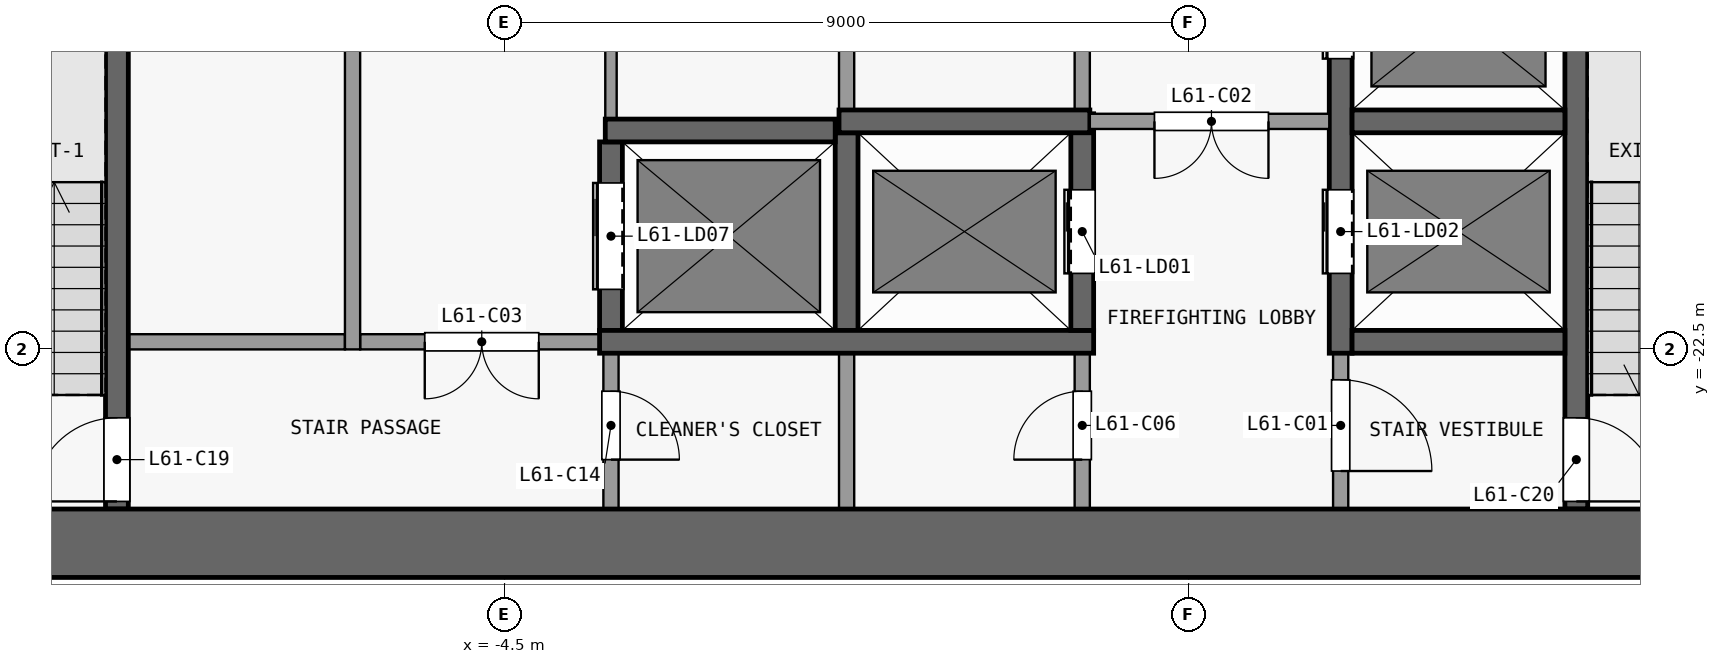
"""IFC4 building model, lengths in metres.
Left out: names, types, materials, properties, quantities, classifications, styles, units other than length and angle.
Written with IfcOpenShell. Run it as: python <this file> out.ifc"""

import sys

from ifc_helpers import new_model, si_unit, direction, frame, frame_2d, origin, place, context, subcontext, project, spatial, rectangle, extrude, element, fill, save


model = new_model("IFC4")
c1 = context("Model", 3, precision=1e-05, world=origin(), true_north=direction((0.0, 1.0)))
c2 = subcontext(c1, "Body", "Model", "MODEL_VIEW")
j1 = project(units=[si_unit("LENGTHUNIT", "METRE"), si_unit("PLANEANGLEUNIT", "RADIAN")], contexts=[c1])
p1 = place(None, origin())
s1 = spatial("IfcSite", under=j1, at=p1, CompositionType="ELEMENT")
p2 = place(p1, origin())
s2 = spatial("IfcBuilding", under=s1, at=p2, CompositionType="ELEMENT")
p3 = place(p2, frame((0.0, 0.0, 241.1)))
s3 = spatial("IfcBuildingStorey", under=s2, at=p3, CompositionType="ELEMENT", Elevation=241.1)
p4 = place(p3, frame((-13.2, -25.05, 0.0), z_axis=(0.0, 0.0, 1.0), x_axis=(1.0, 0.0, 0.0)))
e1 = element("IfcWall", 1, at=p4, inside=s3, PredefinedType="SHEAR", context=c2, shape_type="SweptSolid", body=[
    extrude(rectangle(XDim=26.4, YDim=0.9, at=frame_2d((13.2, 0.0))), origin(), (0.0, 0.0, 1.0), 3.3),
])
p5 = place(p3, frame((-9.45, -22.4, 0.0), z_axis=(0.0, 0.0, 1.0), x_axis=(1.0, 0.0, 0.0)))
e2 = element("IfcWall", 2, at=p5, inside=s3, PredefinedType="PARTITIONING", context=c2, shape_type="SweptSolid", body=[
    extrude(rectangle(XDim=2.85, YDim=0.2, at=frame_2d((1.425, 0.0))), origin(), (0.0, 0.0, 1.0), 3.3),
])
p6 = place(p3, frame((-3.25, -22.4, 0.0), z_axis=(0.0, 0.0, 1.0), x_axis=(-1.0, 0.0, 0.0)))
e3 = element("IfcWall", 3, at=p6, inside=s3, PredefinedType="PARTITIONING", context=c2, shape_type="SweptSolid", body=[
    extrude(rectangle(XDim=3.15, YDim=0.2, at=frame_2d((1.575, 0.0))), origin(), (0.0, 0.0, 1.0), 3.3),
])
p7 = place(p6, frame((0.8, 0.0, 0.0)))
e4 = element("IfcOpeningElement", 4, at=p7, cuts=e3, PredefinedType="OPENING", context=c2, shape_type="SweptSolid", body=[
    extrude(rectangle(XDim=1.5, YDim=2.1, at=frame_2d((0.75, 1.05))), frame((0.0, 0.11, 0.0), z_axis=(0.0, -1.0, 0.0), x_axis=(1.0, 0.0, 0.0)), (0.0, 0.0, 1.0), 0.22),
])
p8 = place(p3, frame((-3.25, -22.4, 0.0), z_axis=(0.0, 0.0, 1.0), x_axis=(1.0, 0.0, 0.0)))
e5 = element("IfcWall", 5, at=p8, inside=s3, PredefinedType="SHEAR", context=c2, shape_type="SweptSolid", body=[
    extrude(rectangle(XDim=6.5, YDim=0.3, at=frame_2d((3.25, 0.0))), origin(), (0.0, 0.0, 1.0), 3.3),
])
p9 = place(p3, frame((6.65, -22.4, 0.0), z_axis=(0.0, 0.0, 1.0), x_axis=(1.0, 0.0, 0.0)))
e6 = element("IfcWall", 6, at=p9, inside=s3, PredefinedType="SHEAR", context=c2, shape_type="SweptSolid", body=[
    extrude(rectangle(XDim=2.8, YDim=0.3, at=frame_2d((1.4, 0.0))), origin(), (0.0, 0.0, 1.0), 3.3),
])
p10 = place(p3, frame((-3.175, -19.62, 0.0), z_axis=(0.0, 0.0, 1.0), x_axis=(1.0, 0.0, 0.0)))
e7 = element("IfcWall", 7, at=p10, inside=s3, PredefinedType="SHEAR", context=c2, shape_type="SweptSolid", body=[
    extrude(rectangle(XDim=3.025, YDim=0.3, at=frame_2d((1.513, 0.0))), origin(), (0.0, 0.0, 1.0), 3.3),
])
p11 = place(p3, frame((-0.1, -19.5, 0.0), z_axis=(0.0, 0.0, 1.0), x_axis=(1.0, 0.0, 0.0)))
e8 = element("IfcWall", 8, at=p11, inside=s3, PredefinedType="SHEAR", context=c2, shape_type="SweptSolid", body=[
    extrude(rectangle(XDim=3.3, YDim=0.3, at=frame_2d((1.65, 0.0))), origin(), (0.0, 0.0, 1.0), 3.3),
])
p12 = place(p3, frame((6.35, -19.5, 0.0), z_axis=(0.0, 0.0, 1.0), x_axis=(-1.0, 0.0, 0.0)))
e9 = element("IfcWall", 9, at=p12, inside=s3, PredefinedType="PARTITIONING", context=c2, shape_type="SweptSolid", body=[
    extrude(rectangle(XDim=3.15, YDim=0.2, at=frame_2d((1.575, 0.0))), origin(), (0.0, 0.0, 1.0), 3.3),
])
p13 = place(p12, frame((0.8, 0.0, 0.0)))
e10 = element("IfcOpeningElement", 10, at=p13, cuts=e9, PredefinedType="OPENING", context=c2, shape_type="SweptSolid", body=[
    extrude(rectangle(XDim=1.5, YDim=2.1, at=frame_2d((0.75, 1.05))), frame((0.0, 0.11, 0.0), z_axis=(0.0, -1.0, 0.0), x_axis=(1.0, 0.0, 0.0)), (0.0, 0.0, 1.0), 0.22),
])
p14 = place(p3, frame((6.65, -19.5, 0.0), z_axis=(0.0, 0.0, 1.0), x_axis=(1.0, 0.0, 0.0)))
e11 = element("IfcWall", 11, at=p14, inside=s3, PredefinedType="SHEAR", context=c2, shape_type="SweptSolid", body=[
    extrude(rectangle(XDim=2.8, YDim=0.3, at=frame_2d((1.4, 0.0))), origin(), (0.0, 0.0, 1.0), 3.3),
])
p15 = place(p3, frame((-9.6, -24.6, 0.0), z_axis=(0.0, 0.0, 1.0), x_axis=(0.0, 1.0, 0.0)))
e12 = element("IfcWall", 12, at=p15, inside=s3, PredefinedType="SHEAR", context=c2, shape_type="SweptSolid", body=[
    extrude(rectangle(XDim=7.7, YDim=0.3, at=frame_2d((3.85, 0.0))), origin(), (0.0, 0.0, 1.0), 3.3),
])
p16 = place(p15, frame((0.1, 0.0, 0.0)))
e13 = element("IfcOpeningElement", 13, at=p16, cuts=e12, PredefinedType="OPENING", context=c2, shape_type="SweptSolid", body=[
    extrude(rectangle(XDim=1.1, YDim=2.1, at=frame_2d((0.55, 1.05))), frame((0.0, 0.16, 0.0), z_axis=(0.0, -1.0, 0.0), x_axis=(1.0, 0.0, 0.0)), (0.0, 0.0, 1.0), 0.32),
])
p17 = place(p3, frame((-6.5, -22.5, 0.0), z_axis=(0.0, 0.0, 1.0), x_axis=(0.0, 1.0, 0.0)))
e14 = element("IfcWall", 14, at=p17, inside=s3, PredefinedType="PARTITIONING", context=c2, shape_type="SweptSolid", body=[
    extrude(rectangle(XDim=14.0, YDim=0.2, at=frame_2d((7.0, 0.0))), origin(), (0.0, 0.0, 1.0), 3.3),
])
p18 = place(p17, frame((6.45, 0.0, 0.0)))
e15 = element("IfcOpeningElement", 15, at=p18, cuts=e14, PredefinedType="OPENING", context=c2, shape_type="SweptSolid", body=[
    extrude(rectangle(XDim=1.2, YDim=2.1, at=frame_2d((0.6, 1.05))), frame((0.0, 0.11, 0.0), z_axis=(0.0, -1.0, 0.0), x_axis=(1.0, 0.0, 0.0)), (0.0, 0.0, 1.0), 0.22),
])
p19 = place(p3, frame((-3.1, -22.55, 0.0), z_axis=(0.0, 0.0, 1.0), x_axis=(0.0, -1.0, 0.0)))
e16 = element("IfcWall", 16, at=p19, inside=s3, PredefinedType="PARTITIONING", context=c2, shape_type="SweptSolid", body=[
    extrude(rectangle(XDim=2.05, YDim=0.2, at=frame_2d((1.025, 0.0))), origin(), (0.0, 0.0, 1.0), 3.3),
])
p20 = place(p19, frame((0.5, 0.0, 0.0)))
e17 = element("IfcOpeningElement", 17, at=p20, cuts=e16, PredefinedType="OPENING", context=c2, shape_type="SweptSolid", body=[
    extrude(rectangle(XDim=0.9, YDim=2.1, at=frame_2d((0.45, 1.05))), frame((0.0, 0.11, 0.0), z_axis=(0.0, -1.0, 0.0), x_axis=(1.0, 0.0, 0.0)), (0.0, 0.0, 1.0), 0.22),
])
p21 = place(p3, frame((-3.1, -22.25, 0.0), z_axis=(0.0, 0.0, 1.0), x_axis=(0.0, 1.0, 0.0)))
e18 = element("IfcWall", 18, at=p21, inside=s3, PredefinedType="SHEAR", context=c2, shape_type="SweptSolid", body=[
    extrude(rectangle(XDim=2.48, YDim=0.3, at=frame_2d((1.24, 0.0))), origin(), (0.0, 0.0, 1.0), 3.3),
])
p22 = place(p21, frame((0.54, 0.0, 0.0)))
e19 = element("IfcOpeningElement", 19, at=p22, cuts=e18, PredefinedType="OPENING", context=c2, shape_type="SweptSolid", body=[
    extrude(rectangle(XDim=1.4, YDim=2.1, at=frame_2d((0.7, 1.05))), frame((0.0, 0.16, 0.0), z_axis=(0.0, -1.0, 0.0), x_axis=(1.0, 0.0, 0.0)), (0.0, 0.0, 1.0), 0.32),
])
p23 = place(p3, frame((-3.1, -8.5, 0.0), z_axis=(0.0, 0.0, 1.0), x_axis=(0.0, -1.0, 0.0)))
e20 = element("IfcWall", 20, at=p23, inside=s3, PredefinedType="PARTITIONING", context=c2, shape_type="SweptSolid", body=[
    extrude(rectangle(XDim=10.97, YDim=0.15, at=frame_2d((5.485, 0.0))), origin(), (0.0, 0.0, 1.0), 3.3),
])
p24 = place(p23, frame((7.74, 0.0, 0.0)))
e21 = element("IfcOpeningElement", 21, at=p24, cuts=e20, PredefinedType="OPENING", context=c2, shape_type="SweptSolid", body=[
    extrude(rectangle(XDim=1.2, YDim=2.1, at=frame_2d((0.6, 1.05))), frame((0.0, 0.085, 0.0), z_axis=(0.0, -1.0, 0.0), x_axis=(1.0, 0.0, 0.0)), (0.0, 0.0, 1.0), 0.17),
])
p25 = place(p23, frame((2.18, 0.0, 0.0)))
e22 = element("IfcOpeningElement", 22, at=p25, cuts=e20, PredefinedType="OPENING", context=c2, shape_type="SweptSolid", body=[
    extrude(rectangle(XDim=1.2, YDim=2.1, at=frame_2d((0.6, 1.05))), frame((0.0, 0.085, 0.0), z_axis=(0.0, -1.0, 0.0), x_axis=(1.0, 0.0, 0.0)), (0.0, 0.0, 1.0), 0.17),
])
p26 = place(p3, frame((0.0, -24.6, 0.0), z_axis=(0.0, 0.0, 1.0), x_axis=(0.0, 1.0, 0.0)))
e23 = element("IfcWall", 23, at=p26, inside=s3, PredefinedType="PARTITIONING", context=c2, shape_type="SweptSolid", body=[
    extrude(rectangle(XDim=2.05, YDim=0.2, at=frame_2d((1.025, 0.0))), origin(), (0.0, 0.0, 1.0), 3.3),
])
p27 = place(p3, frame((0.0, -22.25, 0.0), z_axis=(0.0, 0.0, 1.0), x_axis=(0.0, 1.0, 0.0)))
e24 = element("IfcWall", 24, at=p27, inside=s3, PredefinedType="SHEAR", context=c2, shape_type="SweptSolid", body=[
    extrude(rectangle(XDim=2.6, YDim=0.3, at=frame_2d((1.3, 0.0))), origin(), (0.0, 0.0, 1.0), 3.3),
])
p28 = place(p3, frame((0.0, -19.35, 0.0), z_axis=(0.0, 0.0, 1.0), x_axis=(0.0, 1.0, 0.0)))
e25 = element("IfcWall", 25, at=p28, inside=s3, PredefinedType="PARTITIONING", context=c2, shape_type="SweptSolid", body=[
    extrude(rectangle(XDim=10.85, YDim=0.2, at=frame_2d((5.425, 0.0))), origin(), (0.0, 0.0, 1.0), 3.3),
])
p29 = place(p3, frame((3.1, -24.6, 0.0), z_axis=(0.0, 0.0, 1.0), x_axis=(0.0, 1.0, 0.0)))
e26 = element("IfcWall", 26, at=p29, inside=s3, PredefinedType="PARTITIONING", context=c2, shape_type="SweptSolid", body=[
    extrude(rectangle(XDim=2.05, YDim=0.2, at=frame_2d((1.025, 0.0))), origin(), (0.0, 0.0, 1.0), 3.3),
])
p30 = place(p29, frame((0.65, 0.0, 0.0)))
e27 = element("IfcOpeningElement", 27, at=p30, cuts=e26, PredefinedType="OPENING", context=c2, shape_type="SweptSolid", body=[
    extrude(rectangle(XDim=0.9, YDim=2.1, at=frame_2d((0.45, 1.05))), frame((0.0, 0.11, 0.0), z_axis=(0.0, -1.0, 0.0), x_axis=(1.0, 0.0, 0.0)), (0.0, 0.0, 1.0), 0.22),
])
p31 = place(p3, frame((3.1, -22.25, 0.0), z_axis=(0.0, 0.0, 1.0), x_axis=(0.0, 1.0, 0.0)))
e28 = element("IfcWall", 28, at=p31, inside=s3, PredefinedType="SHEAR", context=c2, shape_type="SweptSolid", body=[
    extrude(rectangle(XDim=2.85, YDim=0.3, at=frame_2d((1.425, 0.0))), origin(), (0.0, 0.0, 1.0), 3.3),
])
p32 = place(p31, frame((0.75, 0.0, 0.0)))
e29 = element("IfcOpeningElement", 29, at=p32, cuts=e28, PredefinedType="OPENING", context=c2, shape_type="SweptSolid", body=[
    extrude(rectangle(XDim=1.1, YDim=2.1, at=frame_2d((0.55, 1.05))), frame((0.0, 0.16, 0.0), z_axis=(0.0, -1.0, 0.0), x_axis=(1.0, 0.0, 0.0)), (0.0, 0.0, 1.0), 0.32),
])
p33 = place(p3, frame((3.1, -19.6, 0.0), z_axis=(0.0, 0.0, 1.0), x_axis=(0.0, 1.0, 0.0)))
e30 = element("IfcWall", 30, at=p33, inside=s3, PredefinedType="PARTITIONING", context=c2, shape_type="SweptSolid", body=[
    extrude(rectangle(XDim=11.1, YDim=0.2, at=frame_2d((5.55, 0.0))), origin(), (0.0, 0.0, 1.0), 3.3),
])
p34 = place(p33, frame((2.25, 0.0, 0.0)))
e31 = element("IfcOpeningElement", 31, at=p34, cuts=e30, PredefinedType="OPENING", context=c2, shape_type="SweptSolid", body=[
    extrude(rectangle(XDim=1.2, YDim=2.1, at=frame_2d((0.6, 1.05))), frame((0.0, 0.11, 0.0), z_axis=(0.0, -1.0, 0.0), x_axis=(1.0, 0.0, 0.0)), (0.0, 0.0, 1.0), 0.22),
])
p35 = place(p33, frame((7.75, 0.0, 0.0)))
e32 = element("IfcOpeningElement", 32, at=p35, cuts=e30, PredefinedType="OPENING", context=c2, shape_type="SweptSolid", body=[
    extrude(rectangle(XDim=1.2, YDim=2.1, at=frame_2d((0.6, 1.05))), frame((0.0, 0.11, 0.0), z_axis=(0.0, -1.0, 0.0), x_axis=(1.0, 0.0, 0.0)), (0.0, 0.0, 1.0), 0.22),
])
p36 = place(p3, frame((6.5, -22.55, 0.0), z_axis=(0.0, 0.0, 1.0), x_axis=(0.0, -1.0, 0.0)))
e33 = element("IfcWall", 33, at=p36, inside=s3, PredefinedType="PARTITIONING", context=c2, shape_type="SweptSolid", body=[
    extrude(rectangle(XDim=2.05, YDim=0.2, at=frame_2d((1.025, 0.0))), origin(), (0.0, 0.0, 1.0), 3.3),
])
p37 = place(p36, frame((0.35, 0.0, 0.0)))
e34 = element("IfcOpeningElement", 34, at=p37, cuts=e33, PredefinedType="OPENING", context=c2, shape_type="SweptSolid", body=[
    extrude(rectangle(XDim=1.2, YDim=2.1, at=frame_2d((0.6, 1.05))), frame((0.0, 0.11, 0.0), z_axis=(0.0, -1.0, 0.0), x_axis=(1.0, 0.0, 0.0)), (0.0, 0.0, 1.0), 0.22),
])
p38 = place(p3, frame((6.5, -22.55, 0.0), z_axis=(0.0, 0.0, 1.0), x_axis=(0.0, 1.0, 0.0)))
e35 = element("IfcWall", 35, at=p38, inside=s3, PredefinedType="SHEAR", context=c2, shape_type="SweptSolid", body=[
    extrude(rectangle(XDim=14.05, YDim=0.3, at=frame_2d((7.025, 0.0))), origin(), (0.0, 0.0, 1.0), 3.3),
])
p39 = place(p38, frame((1.05, 0.0, 0.0)))
e36 = element("IfcOpeningElement", 36, at=p39, cuts=e35, PredefinedType="OPENING", context=c2, shape_type="SweptSolid", body=[
    extrude(rectangle(XDim=1.1, YDim=2.1, at=frame_2d((0.55, 1.05))), frame((0.0, 0.16, 0.0), z_axis=(0.0, -1.0, 0.0), x_axis=(1.0, 0.0, 0.0)), (0.0, 0.0, 1.0), 0.32),
])
p40 = place(p38, frame((3.875, 0.0, 0.0)))
e37 = element("IfcOpeningElement", 37, at=p40, cuts=e35, PredefinedType="OPENING", context=c2, shape_type="SweptSolid", body=[
    extrude(rectangle(XDim=1.1, YDim=2.1, at=frame_2d((0.55, 1.05))), frame((0.0, 0.16, 0.0), z_axis=(0.0, -1.0, 0.0), x_axis=(1.0, 0.0, 0.0)), (0.0, 0.0, 1.0), 0.32),
])
p41 = place(p38, frame((6.625, 0.0, 0.0)))
e38 = element("IfcOpeningElement", 38, at=p41, cuts=e35, PredefinedType="OPENING", context=c2, shape_type="SweptSolid", body=[
    extrude(rectangle(XDim=1.1, YDim=2.1, at=frame_2d((0.55, 1.05))), frame((0.0, 0.16, 0.0), z_axis=(0.0, -1.0, 0.0), x_axis=(1.0, 0.0, 0.0)), (0.0, 0.0, 1.0), 0.32),
])
p42 = place(p38, frame((9.375, 0.0, 0.0)))
e39 = element("IfcOpeningElement", 39, at=p42, cuts=e35, PredefinedType="OPENING", context=c2, shape_type="SweptSolid", body=[
    extrude(rectangle(XDim=1.1, YDim=2.1, at=frame_2d((0.55, 1.05))), frame((0.0, 0.16, 0.0), z_axis=(0.0, -1.0, 0.0), x_axis=(1.0, 0.0, 0.0)), (0.0, 0.0, 1.0), 0.32),
])
p43 = place(p38, frame((12.125, 0.0, 0.0)))
e40 = element("IfcOpeningElement", 40, at=p43, cuts=e35, PredefinedType="OPENING", context=c2, shape_type="SweptSolid", body=[
    extrude(rectangle(XDim=1.1, YDim=2.1, at=frame_2d((0.55, 1.05))), frame((0.0, 0.16, 0.0), z_axis=(0.0, -1.0, 0.0), x_axis=(1.0, 0.0, 0.0)), (0.0, 0.0, 1.0), 0.32),
])
p44 = place(p3, frame((9.6, -16.9, 0.0), z_axis=(0.0, 0.0, 1.0), x_axis=(0.0, -1.0, 0.0)))
e41 = element("IfcWall", 41, at=p44, inside=s3, PredefinedType="SHEAR", context=c2, shape_type="SweptSolid", body=[
    extrude(rectangle(XDim=7.7, YDim=0.3, at=frame_2d((3.85, 0.0))), origin(), (0.0, 0.0, 1.0), 3.3),
])
p45 = place(p44, frame((6.5, 0.0, 0.0)))
e42 = element("IfcOpeningElement", 42, at=p45, cuts=e41, PredefinedType="OPENING", context=c2, shape_type="SweptSolid", body=[
    extrude(rectangle(XDim=1.1, YDim=2.1, at=frame_2d((0.55, 1.05))), frame((0.0, 0.16, 0.0), z_axis=(0.0, -1.0, 0.0), x_axis=(1.0, 0.0, 0.0)), (0.0, 0.0, 1.0), 0.32),
])
p46 = place(p32, origin())
e43 = element("IfcDoor", 43, at=p46, inside=s3, OperationType="DOUBLE_DOOR_SLIDING", PredefinedType="DOOR", context=c2, shape_type="SweptSolid", body=[
    extrude(rectangle(XDim=1.1, YDim=2.1, at=frame_2d((0.55, 1.05))), frame((0.0, 0.025, 0.0), z_axis=(0.0, -1.0, 0.0), x_axis=(1.0, 0.0, 0.0)), (0.0, 0.0, 1.0), 0.05),
])
fill(e29, e43)
p47 = place(p39, origin())
e44 = element("IfcDoor", 44, at=p47, inside=s3, OperationType="DOUBLE_DOOR_SLIDING", PredefinedType="DOOR", context=c2, shape_type="SweptSolid", body=[
    extrude(rectangle(XDim=1.1, YDim=2.1, at=frame_2d((0.55, 1.05))), frame((0.0, 0.025, 0.0), z_axis=(0.0, -1.0, 0.0), x_axis=(1.0, 0.0, 0.0)), (0.0, 0.0, 1.0), 0.05),
])
fill(e36, e44)
p48 = place(p40, origin())
e45 = element("IfcDoor", 45, at=p48, inside=s3, OperationType="DOUBLE_DOOR_SLIDING", PredefinedType="DOOR", context=c2, shape_type="SweptSolid", body=[
    extrude(rectangle(XDim=1.1, YDim=2.1, at=frame_2d((0.55, 1.05))), frame((0.0, 0.025, 0.0), z_axis=(0.0, -1.0, 0.0), x_axis=(1.0, 0.0, 0.0)), (0.0, 0.0, 1.0), 0.05),
])
fill(e37, e45)
p49 = place(p22, origin())
e46 = element("IfcDoor", 46, at=p49, inside=s3, OperationType="DOUBLE_DOOR_SLIDING", PredefinedType="DOOR", context=c2, shape_type="SweptSolid", body=[
    extrude(rectangle(XDim=1.4, YDim=2.1, at=frame_2d((0.7, 1.05))), frame((0.0, 0.025, 0.0), z_axis=(0.0, -1.0, 0.0), x_axis=(1.0, 0.0, 0.0)), (0.0, 0.0, 1.0), 0.05),
])
fill(e19, e46)
p50 = place(p37, origin())
e47 = element("IfcDoor", 47, at=p50, inside=s3, OperationType="SINGLE_SWING_RIGHT", PredefinedType="DOOR", context=c2, shape_type="SweptSolid", body=[
    extrude(rectangle(XDim=1.2, YDim=2.1, at=frame_2d((0.6, 1.05))), frame((0.0, 0.025, 0.0), z_axis=(0.0, -1.0, 0.0), x_axis=(1.0, 0.0, 0.0)), (0.0, 0.0, 1.0), 0.05),
])
fill(e34, e47)
p51 = place(p13, origin())
e48 = element("IfcDoor", 48, at=p51, inside=s3, OperationType="DOUBLE_DOOR_SINGLE_SWING", PredefinedType="DOOR", context=c2, shape_type="SweptSolid", body=[
    extrude(rectangle(XDim=1.5, YDim=2.1, at=frame_2d((0.75, 1.05))), frame((0.0, 0.025, 0.0), z_axis=(0.0, -1.0, 0.0), x_axis=(1.0, 0.0, 0.0)), (0.0, 0.0, 1.0), 0.05),
])
fill(e10, e48)
p52 = place(p7, origin())
e49 = element("IfcDoor", 49, at=p52, inside=s3, OperationType="DOUBLE_DOOR_SINGLE_SWING", PredefinedType="DOOR", context=c2, shape_type="SweptSolid", body=[
    extrude(rectangle(XDim=1.5, YDim=2.1, at=frame_2d((0.75, 1.05))), frame((0.0, 0.025, 0.0), z_axis=(0.0, -1.0, 0.0), x_axis=(1.0, 0.0, 0.0)), (0.0, 0.0, 1.0), 0.05),
])
fill(e4, e49)
p53 = place(p30, origin())
e50 = element("IfcDoor", 50, at=p53, inside=s3, OperationType="SINGLE_SWING_LEFT", PredefinedType="DOOR", context=c2, shape_type="SweptSolid", body=[
    extrude(rectangle(XDim=0.9, YDim=2.1, at=frame_2d((0.45, 1.05))), frame((0.0, 0.025, 0.0), z_axis=(0.0, -1.0, 0.0), x_axis=(1.0, 0.0, 0.0)), (0.0, 0.0, 1.0), 0.05),
])
fill(e27, e50)
p54 = place(p20, origin())
e51 = element("IfcDoor", 51, at=p54, inside=s3, OperationType="SINGLE_SWING_RIGHT", PredefinedType="DOOR", context=c2, shape_type="SweptSolid", body=[
    extrude(rectangle(XDim=0.9, YDim=2.1, at=frame_2d((0.45, 1.05))), frame((0.0, 0.025, 0.0), z_axis=(0.0, -1.0, 0.0), x_axis=(1.0, 0.0, 0.0)), (0.0, 0.0, 1.0), 0.05),
])
fill(e17, e51)
p55 = place(p16, origin())
e52 = element("IfcDoor", 52, at=p55, inside=s3, OperationType="SINGLE_SWING_LEFT", PredefinedType="DOOR", context=c2, shape_type="SweptSolid", body=[
    extrude(rectangle(XDim=1.1, YDim=2.1, at=frame_2d((0.55, 1.05))), frame((0.0, 0.025, 0.0), z_axis=(0.0, -1.0, 0.0), x_axis=(1.0, 0.0, 0.0)), (0.0, 0.0, 1.0), 0.05),
])
fill(e13, e52)
p56 = place(p45, origin())
e53 = element("IfcDoor", 53, at=p56, inside=s3, OperationType="SINGLE_SWING_RIGHT", PredefinedType="DOOR", context=c2, shape_type="SweptSolid", body=[
    extrude(rectangle(XDim=1.1, YDim=2.1, at=frame_2d((0.55, 1.05))), frame((0.0, 0.025, 0.0), z_axis=(0.0, -1.0, 0.0), x_axis=(1.0, 0.0, 0.0)), (0.0, 0.0, 1.0), 0.05),
])
fill(e42, e53)
save(model, sys.argv[1])
